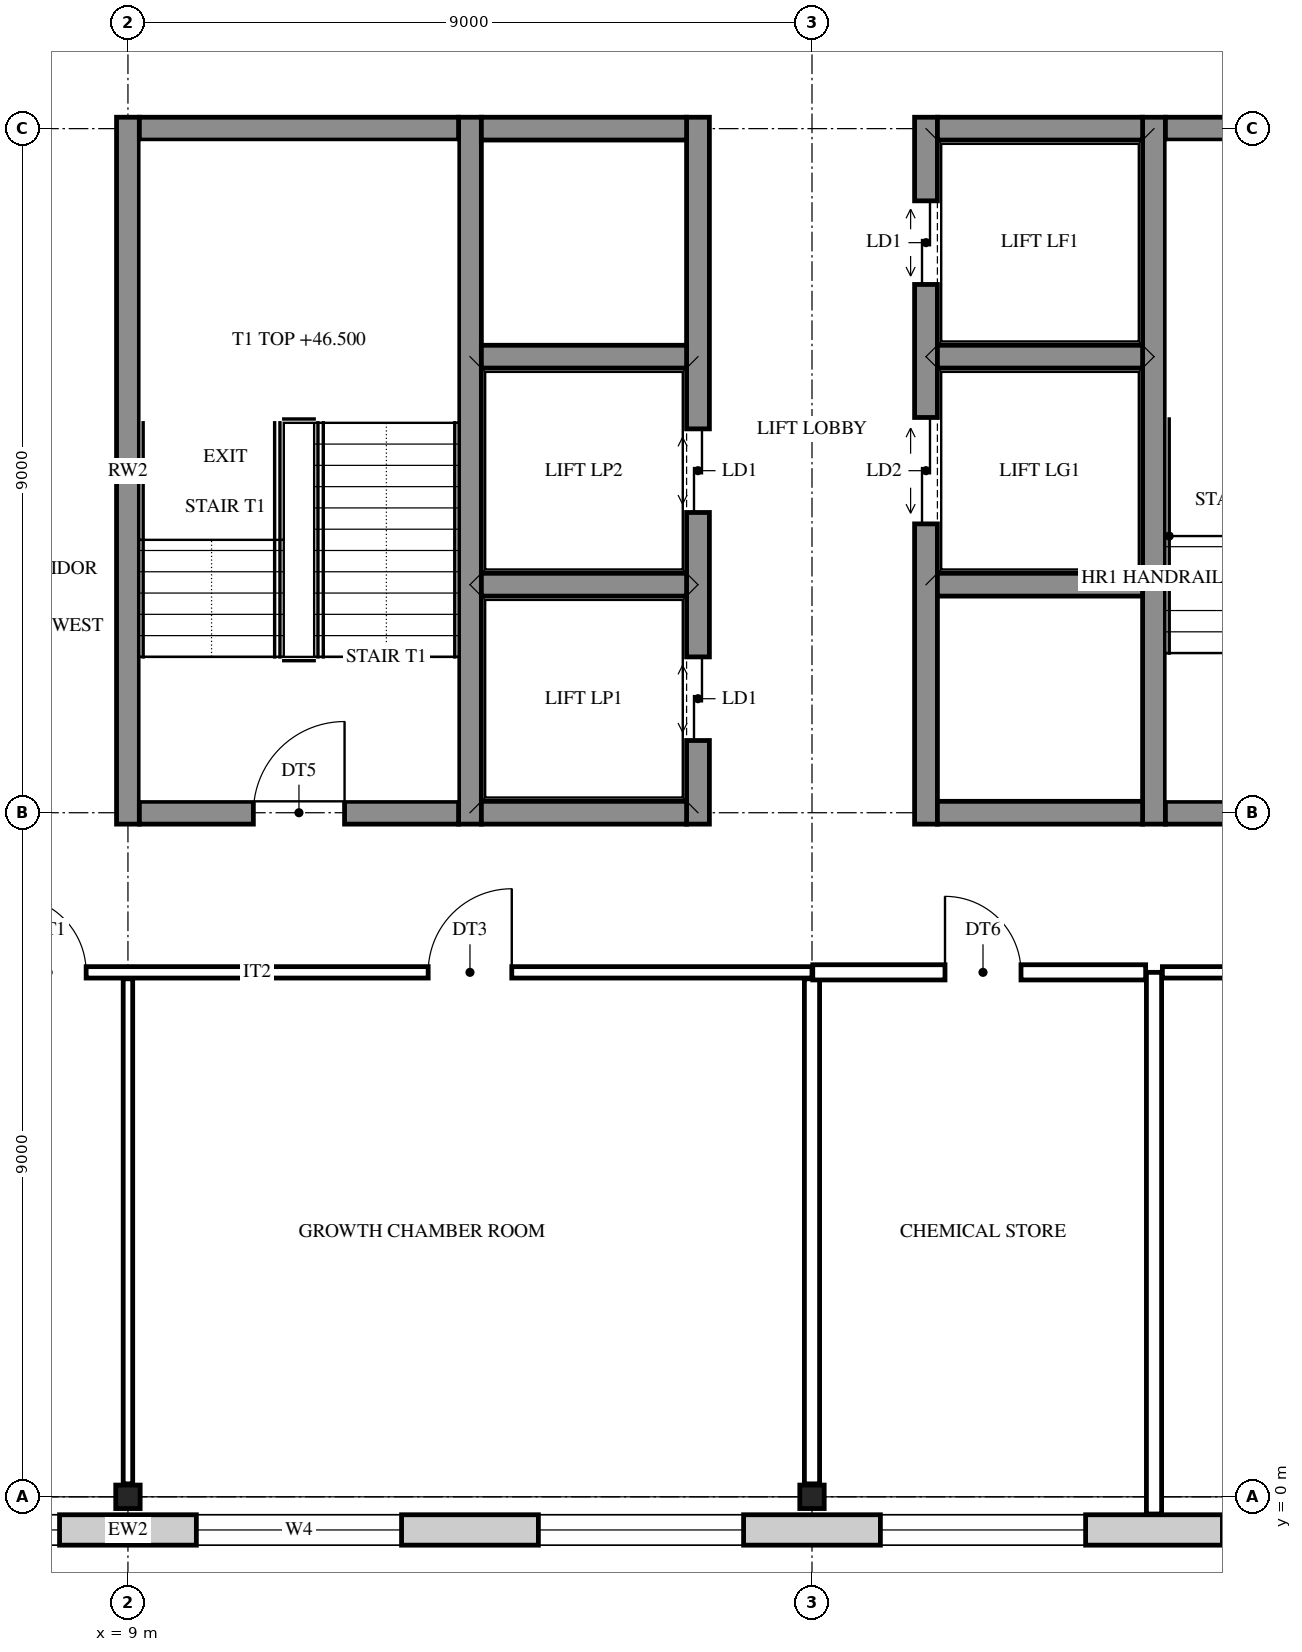
"""IFC4 building model, lengths in metres.
Left out: names, types, materials, properties, quantities, classifications, styles, units other than length and angle.
Written with IfcOpenShell. Run it as: python <this file> out.ifc"""

import sys

from ifc_helpers import new_model, si_unit, direction, frame, frame_2d, origin, origin_2d, place, context, subcontext, project, spatial, rectangle, i_section, extrude, element, fill, save


model = new_model("IFC4")
c1 = context("Model", 3, precision=1e-05, world=origin(), true_north=direction((0.0, 1.0)))
c2 = subcontext(c1, "Body", "Model", "MODEL_VIEW")
j1 = project(units=[si_unit("LENGTHUNIT", "METRE"), si_unit("PLANEANGLEUNIT", "RADIAN")], contexts=[c1])
p1 = place(None, origin())
s1 = spatial("IfcSite", under=j1, at=p1, CompositionType="ELEMENT")
p2 = place(p1, origin())
s2 = spatial("IfcBuilding", under=s1, at=p2, CompositionType="ELEMENT")
p3 = place(p2, frame((0.0, 0.0, 44.4)))
s3 = spatial("IfcBuildingStorey", under=s2, at=p3, CompositionType="ELEMENT", Elevation=44.4)
for number, where, z_axis, x_axis in (
    (1, (9.0, 0.0, 0.0), (0.0, 0.0, 1.0), (0.0, 1.0, 0.0)),
    (2, (18.0, 0.0, 0.0), (0.0, 0.0, 1.0), (0.0, 1.0, 0.0)),
):
    element("IfcColumn", number, at=place(p3, frame(where, z_axis=z_axis, x_axis=x_axis)), inside=s3, PredefinedType="COLUMN", context=c2, shape_type="SweptSolid", body=[
        extrude(i_section(OverallWidth=0.309, OverallDepth=0.321, WebThickness=0.014, FlangeThickness=0.022, FilletRadius=0.017, at=origin_2d()), origin(), (0.0, 0.0, 1.0), 4.2),
    ])
for number, where, z_axis, x_axis in (
    (3, (9.0, 8.85, 0.0), (0.0, 0.0, 1.0), (0.0, 1.0, 0.0)),
    (4, (13.5, 8.85, 0.0), (0.0, 0.0, 1.0), (0.0, 1.0, 0.0)),
):
    element("IfcWall", number, at=place(p3, frame(where, z_axis=z_axis, x_axis=x_axis)), inside=s3, PredefinedType="SHEAR", context=c2, shape_type="SweptSolid", body=[
        extrude(rectangle(XDim=9.3, YDim=0.3, at=frame_2d((4.65, 0.0))), origin(), (0.0, 0.0, 1.0), 4.2),
    ])
p4 = place(p3, frame((16.5, 8.85, 0.0), z_axis=(0.0, 0.0, 1.0), x_axis=(0.0, 1.0, 0.0)))
e5 = element("IfcWall", 5, at=p4, inside=s3, PredefinedType="SHEAR", context=c2, shape_type="SweptSolid", body=[
    extrude(rectangle(XDim=9.3, YDim=0.3, at=frame_2d((4.65, 0.0))), origin(), (0.0, 0.0, 1.0), 4.2),
])
p5 = place(p4, frame((1.1, 0.0, 0.0)))
e6 = element("IfcOpeningElement", 6, at=p5, cuts=e5, PredefinedType="OPENING", context=c2, shape_type="SweptSolid", body=[
    extrude(rectangle(XDim=1.1, YDim=2.1, at=frame_2d((0.55, 1.05))), frame((0.0, 0.16, 0.0), z_axis=(0.0, -1.0, 0.0), x_axis=(1.0, 0.0, 0.0)), (0.0, 0.0, 1.0), 0.32),
])
p6 = place(p4, frame((4.1, 0.0, 0.0)))
e7 = element("IfcOpeningElement", 7, at=p6, cuts=e5, PredefinedType="OPENING", context=c2, shape_type="SweptSolid", body=[
    extrude(rectangle(XDim=1.1, YDim=2.1, at=frame_2d((0.55, 1.05))), frame((0.0, 0.16, 0.0), z_axis=(0.0, -1.0, 0.0), x_axis=(1.0, 0.0, 0.0)), (0.0, 0.0, 1.0), 0.32),
])
p7 = place(p3, frame((19.5, 8.85, 0.0), z_axis=(0.0, 0.0, 1.0), x_axis=(0.0, 1.0, 0.0)))
e8 = element("IfcWall", 8, at=p7, inside=s3, PredefinedType="SHEAR", context=c2, shape_type="SweptSolid", body=[
    extrude(rectangle(XDim=9.3, YDim=0.3, at=frame_2d((4.65, 0.0))), origin(), (0.0, 0.0, 1.0), 4.2),
])
p8 = place(p7, frame((3.95, 0.0, 0.0)))
e9 = element("IfcOpeningElement", 9, at=p8, cuts=e8, PredefinedType="OPENING", context=c2, shape_type="SweptSolid", body=[
    extrude(rectangle(XDim=1.4, YDim=2.1, at=frame_2d((0.7, 1.05))), frame((0.0, 0.16, 0.0), z_axis=(0.0, -1.0, 0.0), x_axis=(1.0, 0.0, 0.0)), (0.0, 0.0, 1.0), 0.32),
])
p9 = place(p7, frame((7.1, 0.0, 0.0)))
e10 = element("IfcOpeningElement", 10, at=p9, cuts=e8, PredefinedType="OPENING", context=c2, shape_type="SweptSolid", body=[
    extrude(rectangle(XDim=1.1, YDim=2.1, at=frame_2d((0.55, 1.05))), frame((0.0, 0.16, 0.0), z_axis=(0.0, -1.0, 0.0), x_axis=(1.0, 0.0, 0.0)), (0.0, 0.0, 1.0), 0.32),
])
p10 = place(p3, frame((22.5, 8.85, 0.0), z_axis=(0.0, 0.0, 1.0), x_axis=(0.0, 1.0, 0.0)))
e11 = element("IfcWall", 11, at=p10, inside=s3, PredefinedType="SHEAR", context=c2, shape_type="SweptSolid", body=[
    extrude(rectangle(XDim=9.3, YDim=0.3, at=frame_2d((4.65, 0.0))), origin(), (0.0, 0.0, 1.0), 4.2),
])
p11 = place(p3, frame((9.15, 9.0, 0.0), z_axis=(0.0, 0.0, 1.0), x_axis=(1.0, 0.0, 0.0)))
e12 = element("IfcWall", 12, at=p11, inside=s3, PredefinedType="SHEAR", context=c2, shape_type="SweptSolid", body=[
    extrude(rectangle(XDim=4.2, YDim=0.3, at=frame_2d((2.1, 0.0))), origin(), (0.0, 0.0, 1.0), 4.2),
])
p12 = place(p11, frame((1.5, 0.0, 0.0)))
e13 = element("IfcOpeningElement", 13, at=p12, cuts=e12, PredefinedType="OPENING", context=c2, shape_type="SweptSolid", body=[
    extrude(rectangle(XDim=1.2, YDim=2.1, at=frame_2d((0.6, 1.05))), frame((0.0, 0.16, 0.0), z_axis=(0.0, -1.0, 0.0), x_axis=(1.0, 0.0, 0.0)), (0.0, 0.0, 1.0), 0.32),
])
for number, where, z_axis, x_axis in (
    (14, (13.65, 9.0, 0.0), (0.0, 0.0, 1.0), (1.0, 0.0, 0.0)),
    (15, (19.65, 9.0, 0.0), (0.0, 0.0, 1.0), (1.0, 0.0, 0.0)),
):
    element("IfcWall", number, at=place(p3, frame(where, z_axis=z_axis, x_axis=x_axis)), inside=s3, PredefinedType="SHEAR", context=c2, shape_type="SweptSolid", body=[
        extrude(rectangle(XDim=2.7, YDim=0.3, at=frame_2d((1.35, 0.0))), origin(), (0.0, 0.0, 1.0), 4.2),
    ])
p13 = place(p3, frame((22.65, 9.0, 0.0), z_axis=(0.0, 0.0, 1.0), x_axis=(1.0, 0.0, 0.0)))
e16 = element("IfcWall", 16, at=p13, inside=s3, PredefinedType="SHEAR", context=c2, shape_type="SweptSolid", body=[
    extrude(rectangle(XDim=4.2, YDim=0.3, at=frame_2d((2.1, 0.0))), origin(), (0.0, 0.0, 1.0), 4.2),
])
p14 = place(p13, frame((1.5, 0.0, 0.0)))
e17 = element("IfcOpeningElement", 17, at=p14, cuts=e16, PredefinedType="OPENING", context=c2, shape_type="SweptSolid", body=[
    extrude(rectangle(XDim=1.2, YDim=2.1, at=frame_2d((0.6, 1.05))), frame((0.0, 0.16, 0.0), z_axis=(0.0, -1.0, 0.0), x_axis=(1.0, 0.0, 0.0)), (0.0, 0.0, 1.0), 0.32),
])
for number, where, z_axis, x_axis in (
    (18, (13.65, 12.0, 0.0), (0.0, 0.0, 1.0), (1.0, 0.0, 0.0)),
    (19, (19.65, 12.0, 0.0), (0.0, 0.0, 1.0), (1.0, 0.0, 0.0)),
    (20, (13.65, 15.0, 0.0), (0.0, 0.0, 1.0), (1.0, 0.0, 0.0)),
    (21, (19.65, 15.0, 0.0), (0.0, 0.0, 1.0), (1.0, 0.0, 0.0)),
):
    element("IfcWall", number, at=place(p3, frame(where, z_axis=z_axis, x_axis=x_axis)), inside=s3, PredefinedType="SHEAR", context=c2, shape_type="SweptSolid", body=[
        extrude(rectangle(XDim=2.7, YDim=0.3, at=frame_2d((1.35, 0.0))), origin(), (0.0, 0.0, 1.0), 4.2),
    ])
p15 = place(p3, frame((9.15, 18.0, 0.0), z_axis=(0.0, 0.0, 1.0), x_axis=(1.0, 0.0, 0.0)))
e22 = element("IfcWall", 22, at=p15, inside=s3, PredefinedType="SHEAR", context=c2, shape_type="SweptSolid", body=[
    extrude(rectangle(XDim=4.2, YDim=0.3, at=frame_2d((2.1, 0.0))), origin(), (0.0, 0.0, 1.0), 4.2),
])
for number, where, z_axis, x_axis in (
    (23, (13.65, 18.0, 0.0), (0.0, 0.0, 1.0), (1.0, 0.0, 0.0)),
    (24, (19.65, 18.0, 0.0), (0.0, 0.0, 1.0), (1.0, 0.0, 0.0)),
):
    element("IfcWall", number, at=place(p3, frame(where, z_axis=z_axis, x_axis=x_axis)), inside=s3, PredefinedType="SHEAR", context=c2, shape_type="SweptSolid", body=[
        extrude(rectangle(XDim=2.7, YDim=0.3, at=frame_2d((1.35, 0.0))), origin(), (0.0, 0.0, 1.0), 4.2),
    ])
p16 = place(p3, frame((22.65, 18.0, 0.0), z_axis=(0.0, 0.0, 1.0), x_axis=(1.0, 0.0, 0.0)))
e25 = element("IfcWall", 25, at=p16, inside=s3, PredefinedType="SHEAR", context=c2, shape_type="SweptSolid", body=[
    extrude(rectangle(XDim=4.2, YDim=0.3, at=frame_2d((2.1, 0.0))), origin(), (0.0, 0.0, 1.0), 4.2),
])
p17 = place(p3, frame((32.125, -0.436, 0.0), z_axis=(0.0, 0.0, 1.0), x_axis=(-1.0, 0.0, 0.0)))
e26 = element("IfcWall", 26, at=p17, inside=s3, PredefinedType="STANDARD", context=c2, shape_type="SweptSolid", body=[
    extrude(rectangle(XDim=32.75, YDim=0.4, at=frame_2d((16.375, 0.0))), origin(), (0.0, 0.0, 1.0), 4.2),
])
p18 = place(p17, frame((28.525, 0.0, 0.9)))
e27 = element("IfcOpeningElement", 27, at=p18, cuts=e26, PredefinedType="OPENING", context=c2, shape_type="SweptSolid", body=[
    extrude(rectangle(XDim=2.7, YDim=2.5, at=frame_2d((1.35, 1.25))), frame((0.0, 0.21, 0.0), z_axis=(0.0, -1.0, 0.0), x_axis=(1.0, 0.0, 0.0)), (0.0, 0.0, 1.0), 0.42),
])
p19 = place(p17, frame((24.025, 0.0, 0.9)))
e28 = element("IfcOpeningElement", 28, at=p19, cuts=e26, PredefinedType="OPENING", context=c2, shape_type="SweptSolid", body=[
    extrude(rectangle(XDim=2.7, YDim=2.5, at=frame_2d((1.35, 1.25))), frame((0.0, 0.21, 0.0), z_axis=(0.0, -1.0, 0.0), x_axis=(1.0, 0.0, 0.0)), (0.0, 0.0, 1.0), 0.42),
])
p20 = place(p17, frame((19.525, 0.0, 0.9)))
e29 = element("IfcOpeningElement", 29, at=p20, cuts=e26, PredefinedType="OPENING", context=c2, shape_type="SweptSolid", body=[
    extrude(rectangle(XDim=2.7, YDim=2.5, at=frame_2d((1.35, 1.25))), frame((0.0, 0.21, 0.0), z_axis=(0.0, -1.0, 0.0), x_axis=(1.0, 0.0, 0.0)), (0.0, 0.0, 1.0), 0.42),
])
p21 = place(p17, frame((15.025, 0.0, 0.9)))
e30 = element("IfcOpeningElement", 30, at=p21, cuts=e26, PredefinedType="OPENING", context=c2, shape_type="SweptSolid", body=[
    extrude(rectangle(XDim=2.7, YDim=2.5, at=frame_2d((1.35, 1.25))), frame((0.0, 0.21, 0.0), z_axis=(0.0, -1.0, 0.0), x_axis=(1.0, 0.0, 0.0)), (0.0, 0.0, 1.0), 0.42),
])
p22 = place(p17, frame((10.525, 0.0, 0.9)))
e31 = element("IfcOpeningElement", 31, at=p22, cuts=e26, PredefinedType="OPENING", context=c2, shape_type="SweptSolid", body=[
    extrude(rectangle(XDim=2.7, YDim=2.5, at=frame_2d((1.35, 1.25))), frame((0.0, 0.21, 0.0), z_axis=(0.0, -1.0, 0.0), x_axis=(1.0, 0.0, 0.0)), (0.0, 0.0, 1.0), 0.42),
])
p23 = place(p17, frame((6.025, 0.0, 0.9)))
e32 = element("IfcOpeningElement", 32, at=p23, cuts=e26, PredefinedType="OPENING", context=c2, shape_type="SweptSolid", body=[
    extrude(rectangle(XDim=2.7, YDim=2.5, at=frame_2d((1.35, 1.25))), frame((0.0, 0.21, 0.0), z_axis=(0.0, -1.0, 0.0), x_axis=(1.0, 0.0, 0.0)), (0.0, 0.0, 1.0), 0.42),
])
p24 = place(p17, frame((1.525, 0.0, 0.9)))
e33 = element("IfcOpeningElement", 33, at=p24, cuts=e26, PredefinedType="OPENING", context=c2, shape_type="SweptSolid", body=[
    extrude(rectangle(XDim=2.7, YDim=2.5, at=frame_2d((1.35, 1.25))), frame((0.0, 0.21, 0.0), z_axis=(0.0, -1.0, 0.0), x_axis=(1.0, 0.0, 0.0)), (0.0, 0.0, 1.0), 0.42),
])
p25 = place(p3, frame((9.0, 0.17, 0.0), z_axis=(0.0, 0.0, 1.0), x_axis=(0.0, 1.0, 0.0)))
e34 = element("IfcWall", 34, at=p25, inside=s3, PredefinedType="PARTITIONING", context=c2, shape_type="SweptSolid", body=[
    extrude(rectangle(XDim=6.645, YDim=0.125, at=frame_2d((3.322, 0.0))), origin(), (0.0, 0.0, 1.0), 3.542),
])
p26 = place(p3, frame((18.0, 0.17, 0.0), z_axis=(0.0, 0.0, 1.0), x_axis=(0.0, 1.0, 0.0)))
e35 = element("IfcWall", 35, at=p26, inside=s3, PredefinedType="PARTITIONING", context=c2, shape_type="SweptSolid", body=[
    extrude(rectangle(XDim=6.645, YDim=0.2, at=frame_2d((3.322, 0.0))), origin(), (0.0, 0.0, 1.0), 3.542),
])
p27 = place(p3, frame((22.5, -0.226, 0.0), z_axis=(0.0, 0.0, 1.0), x_axis=(0.0, 1.0, 0.0)))
e36 = element("IfcWall", 36, at=p27, inside=s3, PredefinedType="PARTITIONING", context=c2, shape_type="SweptSolid", body=[
    extrude(rectangle(XDim=7.126, YDim=0.2, at=frame_2d((3.563, 0.0))), origin(), (0.0, 0.0, 1.0), 3.542),
])
p28 = place(p3, frame((6.9, 6.9, 0.0), z_axis=(0.0, 0.0, 1.0), x_axis=(1.0, 0.0, 0.0)))
e37 = element("IfcWall", 37, at=p28, inside=s3, PredefinedType="PARTITIONING", context=c2, shape_type="SweptSolid", body=[
    extrude(rectangle(XDim=11.1, YDim=0.15, at=frame_2d((5.55, 0.0))), origin(), (0.0, 0.0, 1.0), 3.542),
])
p29 = place(p28, frame((0.55, 0.0, 0.0)))
e38 = element("IfcOpeningElement", 38, at=p29, cuts=e37, PredefinedType="OPENING", context=c2, shape_type="SweptSolid", body=[
    extrude(rectangle(XDim=1.0, YDim=2.1, at=frame_2d((0.5, 1.05))), frame((0.0, 0.085, 0.0), z_axis=(0.0, -1.0, 0.0), x_axis=(1.0, 0.0, 0.0)), (0.0, 0.0, 1.0), 0.17),
])
p30 = place(p28, frame((6.05, 0.0, 0.0)))
e39 = element("IfcOpeningElement", 39, at=p30, cuts=e37, PredefinedType="OPENING", context=c2, shape_type="SweptSolid", body=[
    extrude(rectangle(XDim=1.1, YDim=2.1, at=frame_2d((0.55, 1.05))), frame((0.0, 0.085, 0.0), z_axis=(0.0, -1.0, 0.0), x_axis=(1.0, 0.0, 0.0)), (0.0, 0.0, 1.0), 0.17),
])
p31 = place(p3, frame((18.01, 6.9, 0.0), z_axis=(0.0, 0.0, 1.0), x_axis=(1.0, 0.0, 0.0)))
e40 = element("IfcWall", 40, at=p31, inside=s3, PredefinedType="PARTITIONING", context=c2, shape_type="SweptSolid", body=[
    extrude(rectangle(XDim=4.38, YDim=0.2, at=frame_2d((2.19, 0.0))), origin(), (0.0, 0.0, 1.0), 3.542),
])
p32 = place(p31, frame((1.74, 0.0, 0.0)))
e41 = element("IfcOpeningElement", 41, at=p32, cuts=e40, PredefinedType="OPENING", context=c2, shape_type="SweptSolid", body=[
    extrude(rectangle(XDim=1.0, YDim=2.1, at=frame_2d((0.5, 1.05))), frame((0.0, 0.11, 0.0), z_axis=(0.0, -1.0, 0.0), x_axis=(1.0, 0.0, 0.0)), (0.0, 0.0, 1.0), 0.22),
])
p33 = place(p3, frame((22.61, 6.9, 0.0), z_axis=(0.0, 0.0, 1.0), x_axis=(1.0, 0.0, 0.0)))
e42 = element("IfcWall", 42, at=p33, inside=s3, PredefinedType="PARTITIONING", context=c2, shape_type="SweptSolid", body=[
    extrude(rectangle(XDim=4.39, YDim=0.15, at=frame_2d((2.195, 0.0))), origin(), (0.0, 0.0, 1.0), 3.542),
])
p34 = place(p33, frame((2.84, 0.0, 0.0)))
e43 = element("IfcOpeningElement", 43, at=p34, cuts=e42, PredefinedType="OPENING", context=c2, shape_type="SweptSolid", body=[
    extrude(rectangle(XDim=1.0, YDim=2.1, at=frame_2d((0.5, 1.05))), frame((0.0, 0.085, 0.0), z_axis=(0.0, -1.0, 0.0), x_axis=(1.0, 0.0, 0.0)), (0.0, 0.0, 1.0), 0.17),
])
p35 = place(p19, origin())
e44 = element("IfcWindow", 44, at=p35, inside=s3, PartitioningType="SINGLE_PANEL", PredefinedType="WINDOW", context=c2, shape_type="SweptSolid", body=[
    extrude(rectangle(XDim=2.7, YDim=2.5, at=frame_2d((1.35, 1.25))), frame((0.0, 0.03, 0.0), z_axis=(0.0, -1.0, 0.0), x_axis=(1.0, 0.0, 0.0)), (0.0, 0.0, 1.0), 0.06),
])
fill(e28, e44)
p36 = place(p20, origin())
e45 = element("IfcWindow", 45, at=p36, inside=s3, PartitioningType="SINGLE_PANEL", PredefinedType="WINDOW", context=c2, shape_type="SweptSolid", body=[
    extrude(rectangle(XDim=2.7, YDim=2.5, at=frame_2d((1.35, 1.25))), frame((0.0, 0.03, 0.0), z_axis=(0.0, -1.0, 0.0), x_axis=(1.0, 0.0, 0.0)), (0.0, 0.0, 1.0), 0.06),
])
fill(e29, e45)
p37 = place(p21, origin())
e46 = element("IfcWindow", 46, at=p37, inside=s3, PartitioningType="SINGLE_PANEL", PredefinedType="WINDOW", context=c2, shape_type="SweptSolid", body=[
    extrude(rectangle(XDim=2.7, YDim=2.5, at=frame_2d((1.35, 1.25))), frame((0.0, 0.03, 0.0), z_axis=(0.0, -1.0, 0.0), x_axis=(1.0, 0.0, 0.0)), (0.0, 0.0, 1.0), 0.06),
])
fill(e30, e46)
p38 = place(p22, origin())
e47 = element("IfcWindow", 47, at=p38, inside=s3, PartitioningType="SINGLE_PANEL", PredefinedType="WINDOW", context=c2, shape_type="SweptSolid", body=[
    extrude(rectangle(XDim=2.7, YDim=2.5, at=frame_2d((1.35, 1.25))), frame((0.0, 0.03, 0.0), z_axis=(0.0, -1.0, 0.0), x_axis=(1.0, 0.0, 0.0)), (0.0, 0.0, 1.0), 0.06),
])
fill(e31, e47)
p39 = place(p12, origin())
e48 = element("IfcDoor", 48, at=p39, inside=s3, OperationType="SINGLE_SWING_RIGHT", PredefinedType="DOOR", context=c2, shape_type="SweptSolid", body=[
    extrude(rectangle(XDim=1.2, YDim=2.1, at=frame_2d((0.6, 1.05))), frame((0.0, 0.025, 0.0), z_axis=(0.0, -1.0, 0.0), x_axis=(1.0, 0.0, 0.0)), (0.0, 0.0, 1.0), 0.05),
])
fill(e13, e48)
p40 = place(p29, frame((1.0, 0.0, 0.0), z_axis=(0.0, 0.0, 1.0), x_axis=(-1.0, 0.0, 0.0)))
e49 = element("IfcDoor", 49, at=p40, inside=s3, OperationType="SINGLE_SWING_LEFT", PredefinedType="DOOR", context=c2, shape_type="SweptSolid", body=[
    extrude(rectangle(XDim=1.0, YDim=2.1, at=frame_2d((0.5, 1.05))), frame((0.0, 0.025, 0.0), z_axis=(0.0, -1.0, 0.0), x_axis=(1.0, 0.0, 0.0)), (0.0, 0.0, 1.0), 0.05),
])
fill(e38, e49)
p41 = place(p30, frame((1.1, 0.0, 0.0), z_axis=(0.0, 0.0, 1.0), x_axis=(-1.0, 0.0, 0.0)))
e50 = element("IfcDoor", 50, at=p41, inside=s3, OperationType="SINGLE_SWING_RIGHT", PredefinedType="DOOR", context=c2, shape_type="SweptSolid", body=[
    extrude(rectangle(XDim=1.1, YDim=2.1, at=frame_2d((0.55, 1.05))), frame((0.0, 0.025, 0.0), z_axis=(0.0, -1.0, 0.0), x_axis=(1.0, 0.0, 0.0)), (0.0, 0.0, 1.0), 0.05),
])
fill(e39, e50)
p42 = place(p32, frame((1.0, 0.0, 0.0), z_axis=(0.0, 0.0, 1.0), x_axis=(-1.0, 0.0, 0.0)))
e51 = element("IfcDoor", 51, at=p42, inside=s3, OperationType="SINGLE_SWING_LEFT", PredefinedType="DOOR", context=c2, shape_type="SweptSolid", body=[
    extrude(rectangle(XDim=1.0, YDim=2.1, at=frame_2d((0.5, 1.05))), frame((0.0, 0.025, 0.0), z_axis=(0.0, -1.0, 0.0), x_axis=(1.0, 0.0, 0.0)), (0.0, 0.0, 1.0), 0.05),
])
fill(e41, e51)
p43 = place(p5, origin())
e52 = element("IfcDoor", 52, at=p43, inside=s3, OperationType="DOUBLE_DOOR_SLIDING", PredefinedType="DOOR", context=c2, shape_type="SweptSolid", body=[
    extrude(rectangle(XDim=1.1, YDim=2.1, at=frame_2d((0.55, 1.05))), frame((0.0, 0.025, 0.0), z_axis=(0.0, -1.0, 0.0), x_axis=(1.0, 0.0, 0.0)), (0.0, 0.0, 1.0), 0.05),
])
fill(e6, e52)
p44 = place(p6, origin())
e53 = element("IfcDoor", 53, at=p44, inside=s3, OperationType="DOUBLE_DOOR_SLIDING", PredefinedType="DOOR", context=c2, shape_type="SweptSolid", body=[
    extrude(rectangle(XDim=1.1, YDim=2.1, at=frame_2d((0.55, 1.05))), frame((0.0, 0.025, 0.0), z_axis=(0.0, -1.0, 0.0), x_axis=(1.0, 0.0, 0.0)), (0.0, 0.0, 1.0), 0.05),
])
fill(e7, e53)
p45 = place(p8, origin())
e54 = element("IfcDoor", 54, at=p45, inside=s3, OperationType="DOUBLE_DOOR_SLIDING", PredefinedType="DOOR", context=c2, shape_type="SweptSolid", body=[
    extrude(rectangle(XDim=1.4, YDim=2.1, at=frame_2d((0.7, 1.05))), frame((0.0, 0.025, 0.0), z_axis=(0.0, -1.0, 0.0), x_axis=(1.0, 0.0, 0.0)), (0.0, 0.0, 1.0), 0.05),
])
fill(e9, e54)
p46 = place(p9, origin())
e55 = element("IfcDoor", 55, at=p46, inside=s3, OperationType="DOUBLE_DOOR_SLIDING", PredefinedType="DOOR", context=c2, shape_type="SweptSolid", body=[
    extrude(rectangle(XDim=1.1, YDim=2.1, at=frame_2d((0.55, 1.05))), frame((0.0, 0.025, 0.0), z_axis=(0.0, -1.0, 0.0), x_axis=(1.0, 0.0, 0.0)), (0.0, 0.0, 1.0), 0.05),
])
fill(e10, e55)
save(model, sys.argv[1])
